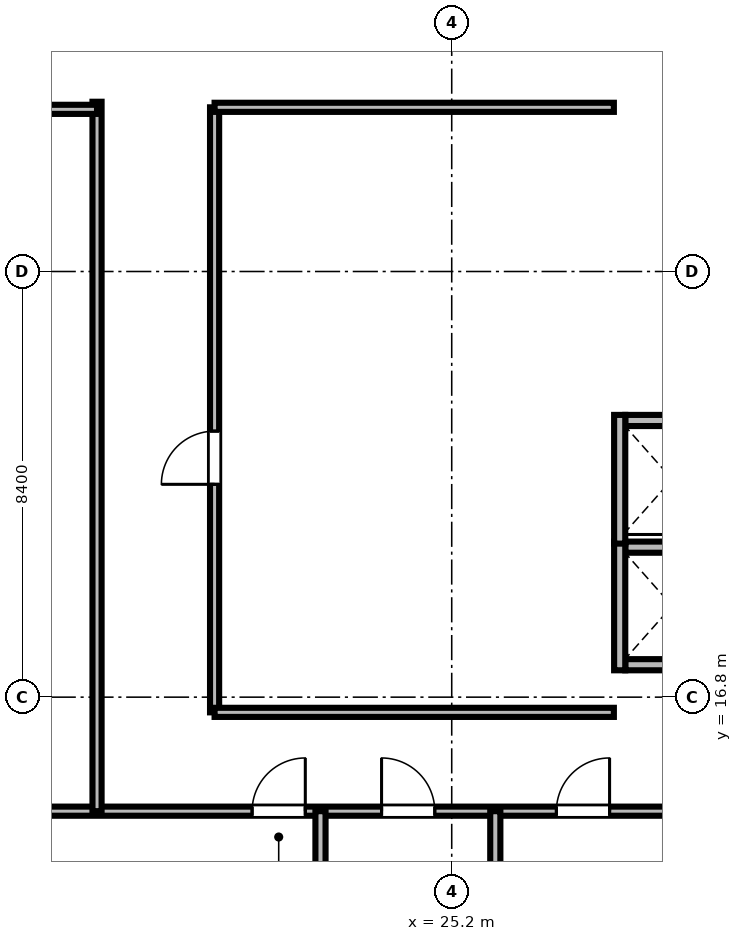
"""IFC4 building model, lengths in metres.
Left out: names, types, materials, properties, quantities, classifications, styles, units other than length and angle.
Written with IfcOpenShell. Run it as: python <this file> out.ifc"""

import sys

from ifc_helpers import new_model, si_unit, direction, frame, frame_2d, origin, place, context, subcontext, project, spatial, rectangle, extrude, source, transform, mapped, element, fill, save


model = new_model("IFC4")
c1 = context("Model", 3, precision=1e-05, world=origin(), true_north=direction((0.0, 1.0)))
c2 = subcontext(c1, "Body", "Model", "MODEL_VIEW")
j1 = project(units=[si_unit("LENGTHUNIT", "METRE"), si_unit("PLANEANGLEUNIT", "RADIAN")], contexts=[c1])
p1 = place(None, origin())
s1 = spatial("IfcSite", under=j1, at=p1, CompositionType="ELEMENT")
p2 = place(p1, origin())
s2 = spatial("IfcBuilding", under=s1, at=p2, CompositionType="ELEMENT")
p3 = place(p2, frame((0.0, 0.0, 107.5)))
s3 = spatial("IfcBuildingStorey", under=s2, at=p3, CompositionType="ELEMENT", Elevation=107.5)
m1 = source(origin(), c2, "Body", "SweptSolid", [
    extrude(rectangle(XDim=1.85, YDim=0.22, at=frame_2d((0.925, 0.0))), origin(), (0.0, 0.0, 1.0), 3.56),
])
for number, where, z_axis, x_axis in (
    (1, (28.625, 17.44, 0.0), (0.0, 0.0, 1.0), (1.0, 0.0, 0.0)),
    (2, (28.625, 19.76, 0.0), (0.0, 0.0, 1.0), (1.0, 0.0, 0.0)),
):
    element("IfcWall", number, at=place(p3, frame(where, z_axis=z_axis, x_axis=x_axis)), inside=s3, PredefinedType="SOLIDWALL", context=c2, shape_type="MappedRepresentation", body=[
        mapped(m1, transform((0.0, 0.0, 0.0), scale=1.0)),
    ])
m2 = source(origin(), c2, "Body", "SweptSolid", [
    extrude(rectangle(XDim=2.54, YDim=0.22, at=frame_2d((1.27, 0.0))), origin(), (0.0, 0.0, 1.0), 3.56),
])
p4 = place(p3, frame((28.515, 17.33, 0.0), z_axis=(0.0, 0.0, 1.0), x_axis=(0.0, 1.0, 0.0)))
e3 = element("IfcWall", 3, at=p4, inside=s3, PredefinedType="SOLIDWALL", context=c2, shape_type="MappedRepresentation", body=[
    mapped(m2, transform((0.0, 0.0, 0.0), scale=1.0)),
])
p5 = place(p3, frame((28.625, 22.26, 0.0), z_axis=(0.0, 0.0, 1.0), x_axis=(1.0, 0.0, 0.0)))
e4 = element("IfcWall", 4, at=p5, inside=s3, PredefinedType="SOLIDWALL", context=c2, shape_type="MappedRepresentation", body=[
    mapped(m1, transform((0.0, 0.0, 0.0), scale=1.0)),
])
p6 = place(p3, frame((28.515, 19.83, 0.0), z_axis=(0.0, 0.0, 1.0), x_axis=(0.0, 1.0, 0.0)))
e5 = element("IfcWall", 5, at=p6, inside=s3, PredefinedType="SOLIDWALL", context=c2, shape_type="MappedRepresentation", body=[
    mapped(m2, transform((0.0, 0.0, 0.0), scale=1.0)),
])
m3 = source(origin(), c2, "Body", "SweptSolid", [
    extrude(rectangle(XDim=46.156, YDim=0.18, at=frame_2d((23.078, 0.0))), origin(), (0.0, 0.0, 1.0), 2.802),
])
p7 = place(p3, frame((6.922, 14.55, 0.0), z_axis=(0.0, 0.0, 1.0), x_axis=(1.0, 0.0, 0.0)))
e6 = element("IfcWall", 6, at=p7, inside=s3, PredefinedType="PARTITIONING", context=c2, shape_type="MappedRepresentation", body=[
    mapped(m3, transform((0.0, 0.0, 0.0), scale=1.0)),
])
m4 = source(origin(), c2, "Body", "SweptSolid", [
    extrude(rectangle(XDim=1.05, YDim=2.2, at=frame_2d((0.525, 1.1))), frame((0.0, 0.1, 0.0), z_axis=(0.0, -1.0, 0.0), x_axis=(1.0, 0.0, 0.0)), (0.0, 0.0, 1.0), 0.2),
])
p8 = place(p7, frame((14.338, 0.0, 0.0)))
e7 = element("IfcOpeningElement", 7, at=p8, cuts=e6, PredefinedType="OPENING", context=c2, shape_type="MappedRepresentation", body=[
    mapped(m4, transform((0.0, 0.0, 0.0), scale=1.0)),
])
p9 = place(p7, frame((16.893, 0.0, 0.0)))
e8 = element("IfcOpeningElement", 8, at=p9, cuts=e6, PredefinedType="OPENING", context=c2, shape_type="MappedRepresentation", body=[
    mapped(m4, transform((0.0, 0.0, 0.0), scale=1.0)),
])
p10 = place(p7, frame((20.344, 0.0, 0.0)))
e9 = element("IfcOpeningElement", 9, at=p10, cuts=e6, PredefinedType="OPENING", context=c2, shape_type="MappedRepresentation", body=[
    mapped(m4, transform((0.0, 0.0, 0.0), scale=1.0)),
])
m5 = source(origin(), c2, "Body", "SweptSolid", [
    extrude(rectangle(XDim=0.95, YDim=2.15, at=frame_2d((0.475, 1.075))), frame((0.0, 0.1, 0.0), z_axis=(0.0, -1.0, 0.0), x_axis=(1.0, 0.0, 0.0)), (0.0, 0.0, 1.0), 0.2),
])
p11 = place(p7, frame((25.842, 0.0, 0.0)))
e10 = element("IfcOpeningElement", 10, at=p11, cuts=e6, PredefinedType="OPENING", context=c2, shape_type="MappedRepresentation", body=[
    mapped(m5, transform((0.0, 0.0, 0.0), scale=1.0)),
])
p12 = place(p7, frame((29.754, 0.0, 0.0)))
e11 = element("IfcOpeningElement", 11, at=p12, cuts=e6, PredefinedType="OPENING", context=c2, shape_type="MappedRepresentation", body=[
    mapped(m4, transform((0.0, 0.0, 0.0), scale=1.0)),
])
p13 = place(p7, frame((35.683, 0.0, 0.0)))
e12 = element("IfcOpeningElement", 12, at=p13, cuts=e6, PredefinedType="OPENING", context=c2, shape_type="MappedRepresentation", body=[
    mapped(m4, transform((0.0, 0.0, 0.0), scale=1.0)),
])
p14 = place(p7, frame((41.828, 0.0, 0.0)))
e13 = element("IfcOpeningElement", 13, at=p14, cuts=e6, PredefinedType="OPENING", context=c2, shape_type="MappedRepresentation", body=[
    mapped(m4, transform((0.0, 0.0, 0.0), scale=1.0)),
])
m6 = source(origin(), c2, "Body", "SweptSolid", [
    extrude(rectangle(XDim=11.94, YDim=0.18, at=frame_2d((5.97, 0.0))), origin(), (0.0, 0.0, 1.0), 2.952),
])
p15 = place(p3, frame((20.52, 16.5, 0.0), z_axis=(0.0, 0.0, 1.0), x_axis=(0.0, 1.0, 0.0)))
e14 = element("IfcWall", 14, at=p15, inside=s3, PredefinedType="PARTITIONING", context=c2, shape_type="MappedRepresentation", body=[
    mapped(m6, transform((0.0, 0.0, 0.0), scale=1.0)),
])
p16 = place(p15, frame((4.5, 0.0, 0.0)))
e15 = element("IfcOpeningElement", 15, at=p16, cuts=e14, PredefinedType="OPENING", context=c2, shape_type="MappedRepresentation", body=[
    mapped(m4, transform((0.0, 0.0, 0.0), scale=1.0)),
])
m7 = source(origin(), c2, "Body", "SweptSolid", [
    extrude(rectangle(XDim=14.0, YDim=0.18, at=frame_2d((7.0, 0.0))), origin(), (0.0, 0.0, 1.0), 2.952),
])
p17 = place(p3, frame((18.2, 14.55, 0.0), z_axis=(0.0, 0.0, 1.0), x_axis=(0.0, 1.0, 0.0)))
e16 = element("IfcWall", 16, at=p17, inside=s3, PredefinedType="PARTITIONING", context=c2, shape_type="MappedRepresentation", body=[
    mapped(m7, transform((0.0, 0.0, 0.0), scale=1.0)),
])
m8 = source(origin(), c2, "Body", "SweptSolid", [
    extrude(rectangle(XDim=12.428, YDim=0.2, at=frame_2d((6.214, 0.0))), origin(), (0.0, 0.0, 1.0), 2.802),
])
for number, where, z_axis, x_axis in (
    (17, (22.61, 2.122, 0.0), (0.0, 0.0, 1.0), (0.0, 1.0, 0.0)),
    (18, (26.06, 2.122, 0.0), (0.0, 0.0, 1.0), (0.0, 1.0, 0.0)),
):
    element("IfcWall", number, at=place(p3, frame(where, z_axis=z_axis, x_axis=x_axis)), inside=s3, PredefinedType="PARTITIONING", context=c2, shape_type="MappedRepresentation", body=[
        mapped(m8, transform((0.0, 0.0, 0.0), scale=1.0)),
    ])
m9 = source(origin(), c2, "Body", "SweptSolid", [
    extrude(rectangle(XDim=11.47, YDim=0.18, at=frame_2d((5.735, 0.0))), origin(), (0.0, 0.0, 1.0), 2.802),
])
p18 = place(p3, frame((6.73, 28.4, 0.0), z_axis=(0.0, 0.0, 1.0), x_axis=(1.0, 0.0, 0.0)))
e19 = element("IfcWall", 19, at=p18, inside=s3, PredefinedType="PARTITIONING", context=c2, shape_type="MappedRepresentation", body=[
    mapped(m9, transform((0.0, 0.0, 0.0), scale=1.0)),
])
m10 = source(origin(), c2, "Body", "SweptSolid", [
    extrude(rectangle(XDim=7.88, YDim=0.18, at=frame_2d((3.94, 0.0))), origin(), (0.0, 0.0, 1.0), 3.56),
])
for number, where, z_axis, x_axis in (
    (20, (20.52, 16.5, 0.0), (0.0, 0.0, 1.0), (1.0, 0.0, 0.0)),
    (21, (20.52, 28.44, 0.0), (0.0, 0.0, 1.0), (1.0, 0.0, 0.0)),
):
    element("IfcWall", number, at=place(p3, frame(where, z_axis=z_axis, x_axis=x_axis)), inside=s3, PredefinedType="PARTITIONING", context=c2, shape_type="MappedRepresentation", body=[
        mapped(m10, transform((0.0, 0.0, 0.0), scale=1.0)),
    ])
m11 = source(origin(), c2, "Body", "SweptSolid", [
    extrude(rectangle(XDim=1.05, YDim=2.2, at=frame_2d((0.525, 1.1))), frame((0.0, 0.025, 0.0), z_axis=(0.0, -1.0, 0.0), x_axis=(1.0, 0.0, 0.0)), (0.0, 0.0, 1.0), 0.05),
])
p19 = place(p8, origin())
e22 = element("IfcDoor", 22, at=p19, inside=s3, OperationType="SINGLE_SWING_RIGHT", PredefinedType="DOOR", context=c2, shape_type="MappedRepresentation", body=[
    mapped(m11, transform((0.0, 0.0, 0.0), scale=1.0)),
])
fill(e7, e22)
p20 = place(p9, origin())
e23 = element("IfcDoor", 23, at=p20, inside=s3, OperationType="SINGLE_SWING_LEFT", PredefinedType="DOOR", context=c2, shape_type="MappedRepresentation", body=[
    mapped(m11, transform((0.0, 0.0, 0.0), scale=1.0)),
])
fill(e8, e23)
p21 = place(p10, origin())
e24 = element("IfcDoor", 24, at=p21, inside=s3, OperationType="SINGLE_SWING_RIGHT", PredefinedType="DOOR", context=c2, shape_type="MappedRepresentation", body=[
    mapped(m11, transform((0.0, 0.0, 0.0), scale=1.0)),
])
fill(e9, e24)
p22 = place(p16, origin())
e25 = element("IfcDoor", 25, at=p22, inside=s3, OperationType="SINGLE_SWING_LEFT", PredefinedType="DOOR", context=c2, shape_type="MappedRepresentation", body=[
    mapped(m11, transform((0.0, 0.0, 0.0), scale=1.0)),
])
fill(e15, e25)
save(model, sys.argv[1])
